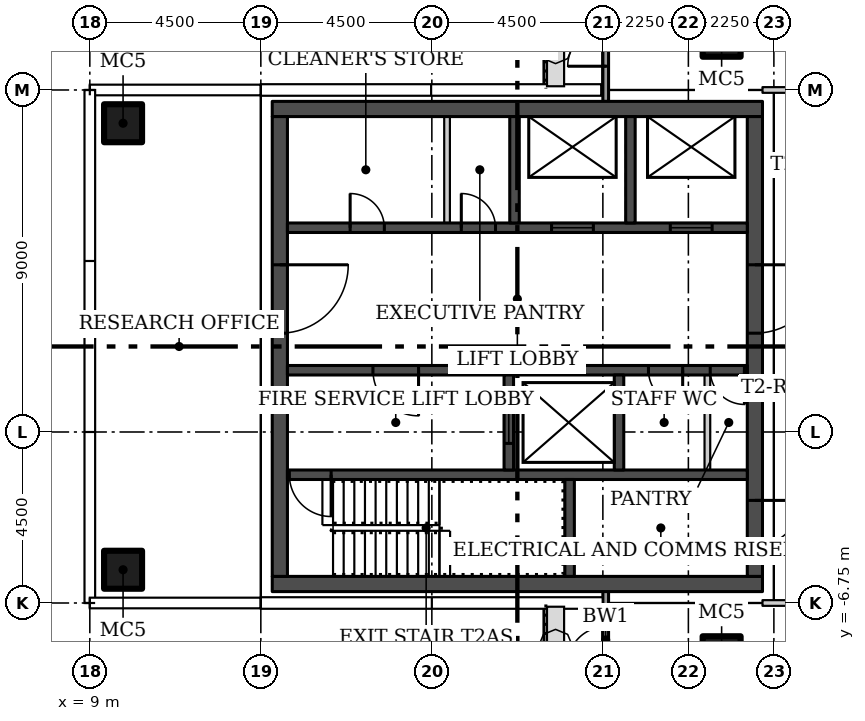
"""IFC4 building model, lengths in metres.
Left out: names, types, materials, properties, quantities, classifications, styles, units other than length and angle.
Written with IfcOpenShell. Run it as: python <this file> out.ifc"""

import sys

from ifc_helpers import new_model, si_unit, direction, frame, frame_2d, origin, origin_2d, place, context, subcontext, project, spatial, rectangle, hollow_rectangle, extrude, element, fill, save


model = new_model("IFC4")
c1 = context("Model", 3, precision=1e-05, world=origin(), true_north=direction((0.0, 1.0)))
c2 = subcontext(c1, "Body", "Model", "MODEL_VIEW")
j1 = project(units=[si_unit("LENGTHUNIT", "METRE"), si_unit("PLANEANGLEUNIT", "RADIAN")], contexts=[c1])
p1 = place(None, origin())
s1 = spatial("IfcSite", under=j1, at=p1, CompositionType="ELEMENT")
p2 = place(p1, origin())
s2 = spatial("IfcBuilding", under=s1, at=p2, CompositionType="ELEMENT")
p3 = place(p2, frame((0.0, 0.0, 182.7)))
s3 = spatial("IfcBuildingStorey", under=s2, at=p3, CompositionType="ELEMENT", Elevation=182.7)
for number, where in (
    (1, (25.625, 8.125, 0.0)),
    (2, (25.625, -8.125, 0.0)),
    (3, (9.875, -5.875, 0.0)),
    (4, (9.875, 5.875, 0.0)),
):
    element("IfcColumn", number, at=place(p3, frame(where)), inside=s3, PredefinedType="COLUMN", context=c2, shape_type="SweptSolid", body=[
        extrude(hollow_rectangle(XDim=1.0, YDim=1.0, WallThickness=0.04, at=origin_2d()), origin(), (0.0, 0.0, 1.0), 3.55),
    ])
p4 = place(p3, frame((26.7, 6.75, 0.0)))
e5 = element("IfcWall", 5, at=p4, inside=s3, PredefinedType="PARTITIONING", context=c2, shape_type="SweptSolid", body=[
    extrude(rectangle(XDim=14.1, YDim=0.15, at=frame_2d((7.05, 0.0))), origin(), (0.0, 0.0, 1.0), 3.55),
])
p5 = place(p4, frame((10.8, 0.0, 0.0)))
e6 = element("IfcOpeningElement", 6, at=p5, cuts=e5, PredefinedType="OPENING", context=c2, shape_type="SweptSolid", body=[
    extrude(rectangle(XDim=1.5, YDim=2.1, at=frame_2d((0.75, 1.05))), frame((0.0, 0.085, 0.0), z_axis=(0.0, -1.0, 0.0), x_axis=(1.0, 0.0, 0.0)), (0.0, 0.0, 1.0), 0.17),
])
p6 = place(p4, frame((6.6, 0.0, 0.0)))
e7 = element("IfcOpeningElement", 7, at=p6, cuts=e5, PredefinedType="OPENING", context=c2, shape_type="SweptSolid", body=[
    extrude(rectangle(XDim=0.9, YDim=2.1, at=frame_2d((0.45, 1.05))), frame((0.0, 0.085, 0.0), z_axis=(0.0, -1.0, 0.0), x_axis=(1.0, 0.0, 0.0)), (0.0, 0.0, 1.0), 0.17),
])
p7 = place(p4, frame((1.8, 0.0, 0.0)))
e8 = element("IfcOpeningElement", 8, at=p7, cuts=e5, PredefinedType="OPENING", context=c2, shape_type="SweptSolid", body=[
    extrude(rectangle(XDim=1.5, YDim=2.1, at=frame_2d((0.75, 1.05))), frame((0.0, 0.085, 0.0), z_axis=(0.0, -1.0, 0.0), x_axis=(1.0, 0.0, 0.0)), (0.0, 0.0, 1.0), 0.17),
])
p8 = place(p3, frame((40.8, -6.75, 0.0), z_axis=(0.0, 0.0, 1.0), x_axis=(-1.0, 0.0, 0.0)))
e9 = element("IfcWall", 9, at=p8, inside=s3, PredefinedType="PARTITIONING", context=c2, shape_type="SweptSolid", body=[
    extrude(rectangle(XDim=14.1, YDim=0.15, at=frame_2d((7.05, 0.0))), origin(), (0.0, 0.0, 1.0), 3.55),
])
p9 = place(p8, frame((6.3, 0.0, 0.0)))
e10 = element("IfcOpeningElement", 10, at=p9, cuts=e9, PredefinedType="OPENING", context=c2, shape_type="SweptSolid", body=[
    extrude(rectangle(XDim=1.5, YDim=2.1, at=frame_2d((0.75, 1.05))), frame((0.0, 0.085, 0.0), z_axis=(0.0, -1.0, 0.0), x_axis=(1.0, 0.0, 0.0)), (0.0, 0.0, 1.0), 0.17),
])
p10 = place(p3, frame((22.575, 6.448, 0.0), z_axis=(0.0, 0.0, 1.0), x_axis=(0.0, 1.0, 0.0)))
e11 = element("IfcWall", 11, at=p10, inside=s3, PredefinedType="SOLIDWALL", context=c2, shape_type="SweptSolid", body=[
    extrude(rectangle(XDim=2.552, YDim=0.15, at=frame_2d((1.276, 0.0))), origin(), (0.0, 0.0, 1.0), 3.45),
])
p11 = place(p10, frame((0.927, 0.0, 0.0)))
e12 = element("IfcOpeningElement", 12, at=p11, cuts=e11, PredefinedType="OPENING", context=c2, shape_type="SweptSolid", body=[
    extrude(rectangle(XDim=1.0, YDim=2.4, at=frame_2d((0.5, 1.2))), frame((0.0, 0.085, 0.0), z_axis=(0.0, -1.0, 0.0), x_axis=(1.0, 0.0, 0.0)), (0.0, 0.0, 1.0), 0.17),
])
p12 = place(p3, frame((22.575, -9.0, 0.0), z_axis=(0.0, 0.0, 1.0), x_axis=(0.0, 1.0, 0.0)))
e13 = element("IfcWall", 13, at=p12, inside=s3, PredefinedType="SOLIDWALL", context=c2, shape_type="SweptSolid", body=[
    extrude(rectangle(XDim=2.557, YDim=0.15, at=frame_2d((1.278, 0.0))), origin(), (0.0, 0.0, 1.0), 3.45),
])
p13 = place(p12, frame((0.625, 0.0, 0.0)))
e14 = element("IfcOpeningElement", 14, at=p13, cuts=e13, PredefinedType="OPENING", context=c2, shape_type="SweptSolid", body=[
    extrude(rectangle(XDim=1.0, YDim=2.4, at=frame_2d((0.5, 1.2))), frame((0.0, 0.085, 0.0), z_axis=(0.0, -1.0, 0.0), x_axis=(1.0, 0.0, 0.0)), (0.0, 0.0, 1.0), 0.17),
])
for number, where in (
    (15, (13.8, -6.25, 0.0)),
    (16, (13.8, 6.25, 0.0)),
):
    element("IfcWall", number, at=place(p3, frame(where)), inside=s3, PredefinedType="SHEAR", context=c2, shape_type="SweptSolid", body=[
        extrude(rectangle(XDim=12.9, YDim=0.4, at=frame_2d((6.45, 0.0))), origin(), (0.0, 0.0, 1.0), 3.55),
    ])
p14 = place(p3, frame((14.0, 6.05, 0.0), z_axis=(0.0, 0.0, 1.0), x_axis=(0.0, -1.0, 0.0)))
e17 = element("IfcWall", 17, at=p14, inside=s3, PredefinedType="SHEAR", context=c2, shape_type="SweptSolid", body=[
    extrude(rectangle(XDim=12.1, YDim=0.4, at=frame_2d((6.05, 0.0))), origin(), (0.0, 0.0, 1.0), 3.55),
])
p15 = place(p14, frame((3.9, 0.0, 0.0)))
e18 = element("IfcOpeningElement", 18, at=p15, cuts=e17, PredefinedType="OPENING", context=c2, shape_type="SweptSolid", body=[
    extrude(rectangle(XDim=1.8, YDim=2.4, at=frame_2d((0.9, 1.2))), frame((0.0, 0.21, 0.0), z_axis=(0.0, -1.0, 0.0), x_axis=(1.0, 0.0, 0.0)), (0.0, 0.0, 1.0), 0.42),
])
p16 = place(p3, frame((26.5, 6.05, 0.0), z_axis=(0.0, 0.0, 1.0), x_axis=(0.0, -1.0, 0.0)))
e19 = element("IfcWall", 19, at=p16, inside=s3, PredefinedType="SHEAR", context=c2, shape_type="SweptSolid", body=[
    extrude(rectangle(XDim=12.1, YDim=0.4, at=frame_2d((6.05, 0.0))), origin(), (0.0, 0.0, 1.0), 3.55),
])
p17 = place(p16, frame((10.1, 0.0, 0.0)))
e20 = element("IfcOpeningElement", 20, at=p17, cuts=e19, PredefinedType="OPENING", context=c2, shape_type="SweptSolid", body=[
    extrude(rectangle(XDim=1.2, YDim=2.1, at=frame_2d((0.6, 1.05))), frame((0.0, 0.21, 0.0), z_axis=(0.0, -1.0, 0.0), x_axis=(1.0, 0.0, 0.0)), (0.0, 0.0, 1.0), 0.42),
])
p18 = place(p16, frame((3.9, 0.0, 0.0)))
e21 = element("IfcOpeningElement", 21, at=p18, cuts=e19, PredefinedType="OPENING", context=c2, shape_type="SweptSolid", body=[
    extrude(rectangle(XDim=1.8, YDim=2.4, at=frame_2d((0.9, 1.2))), frame((0.0, 0.21, 0.0), z_axis=(0.0, -1.0, 0.0), x_axis=(1.0, 0.0, 0.0)), (0.0, 0.0, 1.0), 0.42),
])
p19 = place(p3, frame((26.3, -3.375, 0.0), z_axis=(0.0, 0.0, 1.0), x_axis=(-1.0, 0.0, 0.0)))
e22 = element("IfcWall", 22, at=p19, inside=s3, PredefinedType="SHEAR", context=c2, shape_type="SweptSolid", body=[
    extrude(rectangle(XDim=12.1, YDim=0.25, at=frame_2d((6.05, 0.0))), origin(), (0.0, 0.0, 1.0), 3.55),
])
p20 = place(p19, frame((10.95, 0.0, 0.0)))
e23 = element("IfcOpeningElement", 23, at=p20, cuts=e22, PredefinedType="OPENING", context=c2, shape_type="SweptSolid", body=[
    extrude(rectangle(XDim=1.1, YDim=2.1, at=frame_2d((0.55, 1.05))), frame((0.0, 0.135, 0.0), z_axis=(0.0, -1.0, 0.0), x_axis=(1.0, 0.0, 0.0)), (0.0, 0.0, 1.0), 0.27),
])
p21 = place(p3, frame((21.625, -6.05, 0.0), z_axis=(0.0, 0.0, 1.0), x_axis=(0.0, 1.0, 0.0)))
e24 = element("IfcWall", 24, at=p21, inside=s3, PredefinedType="SHEAR", context=c2, shape_type="SweptSolid", body=[
    extrude(rectangle(XDim=2.55, YDim=0.25, at=frame_2d((1.275, 0.0))), origin(), (0.0, 0.0, 1.0), 3.55),
])
p22 = place(p3, frame((26.3, -0.625, 0.0), z_axis=(0.0, 0.0, 1.0), x_axis=(-1.0, 0.0, 0.0)))
e25 = element("IfcWall", 25, at=p22, inside=s3, PredefinedType="SHEAR", context=c2, shape_type="SweptSolid", body=[
    extrude(rectangle(XDim=12.1, YDim=0.25, at=frame_2d((6.05, 0.0))), origin(), (0.0, 0.0, 1.0), 3.55),
])
p23 = place(p22, frame((8.65, 0.0, 0.0)))
e26 = element("IfcOpeningElement", 26, at=p23, cuts=e25, PredefinedType="OPENING", context=c2, shape_type="SweptSolid", body=[
    extrude(rectangle(XDim=1.2, YDim=2.1, at=frame_2d((0.6, 1.05))), frame((0.0, 0.135, 0.0), z_axis=(0.0, -1.0, 0.0), x_axis=(1.0, 0.0, 0.0)), (0.0, 0.0, 1.0), 0.27),
])
p24 = place(p22, frame((1.7, 0.0, 0.0)))
e27 = element("IfcOpeningElement", 27, at=p24, cuts=e25, PredefinedType="OPENING", context=c2, shape_type="SweptSolid", body=[
    extrude(rectangle(XDim=0.9, YDim=2.1, at=frame_2d((0.45, 1.05))), frame((0.0, 0.135, 0.0), z_axis=(0.0, -1.0, 0.0), x_axis=(1.0, 0.0, 0.0)), (0.0, 0.0, 1.0), 0.27),
])
p25 = place(p22, frame((0.075, 0.0, 0.0)))
e28 = element("IfcOpeningElement", 28, at=p25, cuts=e25, PredefinedType="OPENING", context=c2, shape_type="SweptSolid", body=[
    extrude(rectangle(XDim=0.9, YDim=2.1, at=frame_2d((0.45, 1.05))), frame((0.0, 0.135, 0.0), z_axis=(0.0, -1.0, 0.0), x_axis=(1.0, 0.0, 0.0)), (0.0, 0.0, 1.0), 0.27),
])
p26 = place(p3, frame((20.025, -3.25, 0.0), z_axis=(0.0, 0.0, 1.0), x_axis=(0.0, 1.0, 0.0)))
e29 = element("IfcWall", 29, at=p26, inside=s3, PredefinedType="SHEAR", context=c2, shape_type="SweptSolid", body=[
    extrude(rectangle(XDim=2.5, YDim=0.25, at=frame_2d((1.25, 0.0))), origin(), (0.0, 0.0, 1.0), 3.55),
])
p27 = place(p26, frame((0.7, 0.0, 0.0)))
e30 = element("IfcOpeningElement", 30, at=p27, cuts=e29, PredefinedType="OPENING", context=c2, shape_type="SweptSolid", body=[
    extrude(rectangle(XDim=1.1, YDim=2.1, at=frame_2d((0.55, 1.05))), frame((0.0, 0.135, 0.0), z_axis=(0.0, -1.0, 0.0), x_axis=(1.0, 0.0, 0.0)), (0.0, 0.0, 1.0), 0.27),
])
p28 = place(p3, frame((22.925, -3.25, 0.0), z_axis=(0.0, 0.0, 1.0), x_axis=(0.0, 1.0, 0.0)))
e31 = element("IfcWall", 31, at=p28, inside=s3, PredefinedType="SHEAR", context=c2, shape_type="SweptSolid", body=[
    extrude(rectangle(XDim=2.5, YDim=0.25, at=frame_2d((1.25, 0.0))), origin(), (0.0, 0.0, 1.0), 3.55),
])
p29 = place(p3, frame((25.25, -3.25, 0.0), z_axis=(0.0, 0.0, 1.0), x_axis=(0.0, 1.0, 0.0)))
e32 = element("IfcWall", 32, at=p29, inside=s3, PredefinedType="PARTITIONING", context=c2, shape_type="SweptSolid", body=[
    extrude(rectangle(XDim=2.5, YDim=0.15, at=frame_2d((1.25, 0.0))), origin(), (0.0, 0.0, 1.0), 3.55),
])
p30 = place(p3, frame((14.2, 3.125, 0.0)))
e33 = element("IfcWall", 33, at=p30, inside=s3, PredefinedType="SHEAR", context=c2, shape_type="SweptSolid", body=[
    extrude(rectangle(XDim=12.1, YDim=0.25, at=frame_2d((6.05, 0.0))), origin(), (0.0, 0.0, 1.0), 3.55),
])
p31 = place(p30, frame((6.95, 0.0, 0.0)))
e34 = element("IfcOpeningElement", 34, at=p31, cuts=e33, PredefinedType="OPENING", context=c2, shape_type="SweptSolid", body=[
    extrude(rectangle(XDim=1.1, YDim=2.1, at=frame_2d((0.55, 1.05))), frame((0.0, 0.135, 0.0), z_axis=(0.0, -1.0, 0.0), x_axis=(1.0, 0.0, 0.0)), (0.0, 0.0, 1.0), 0.27),
])
p32 = place(p30, frame((10.075, 0.0, 0.0)))
e35 = element("IfcOpeningElement", 35, at=p32, cuts=e33, PredefinedType="OPENING", context=c2, shape_type="SweptSolid", body=[
    extrude(rectangle(XDim=1.1, YDim=2.1, at=frame_2d((0.55, 1.05))), frame((0.0, 0.135, 0.0), z_axis=(0.0, -1.0, 0.0), x_axis=(1.0, 0.0, 0.0)), (0.0, 0.0, 1.0), 0.27),
])
p33 = place(p30, frame((1.65, 0.0, 0.0)))
e36 = element("IfcOpeningElement", 36, at=p33, cuts=e33, PredefinedType="OPENING", context=c2, shape_type="SweptSolid", body=[
    extrude(rectangle(XDim=0.9, YDim=2.1, at=frame_2d((0.45, 1.05))), frame((0.0, 0.135, 0.0), z_axis=(0.0, -1.0, 0.0), x_axis=(1.0, 0.0, 0.0)), (0.0, 0.0, 1.0), 0.27),
])
p34 = place(p30, frame((4.575, 0.0, 0.0)))
e37 = element("IfcOpeningElement", 37, at=p34, cuts=e33, PredefinedType="OPENING", context=c2, shape_type="SweptSolid", body=[
    extrude(rectangle(XDim=0.9, YDim=2.1, at=frame_2d((0.45, 1.05))), frame((0.0, 0.135, 0.0), z_axis=(0.0, -1.0, 0.0), x_axis=(1.0, 0.0, 0.0)), (0.0, 0.0, 1.0), 0.27),
])
for number, where, z_axis, x_axis in (
    (38, (20.175, 3.25, 0.0), (0.0, 0.0, 1.0), (0.0, 1.0, 0.0)),
    (39, (23.225, 3.25, 0.0), (0.0, 0.0, 1.0), (0.0, 1.0, 0.0)),
):
    element("IfcWall", number, at=place(p3, frame(where, z_axis=z_axis, x_axis=x_axis)), inside=s3, PredefinedType="SHEAR", context=c2, shape_type="SweptSolid", body=[
        extrude(rectangle(XDim=2.8, YDim=0.25, at=frame_2d((1.4, 0.0))), origin(), (0.0, 0.0, 1.0), 3.55),
    ])
p35 = place(p3, frame((18.4, 3.25, 0.0), z_axis=(0.0, 0.0, 1.0), x_axis=(0.0, 1.0, 0.0)))
e40 = element("IfcWall", 40, at=p35, inside=s3, PredefinedType="PARTITIONING", context=c2, shape_type="SweptSolid", body=[
    extrude(rectangle(XDim=2.8, YDim=0.15, at=frame_2d((1.4, 0.0))), origin(), (0.0, 0.0, 1.0), 3.55),
])
p36 = place(p11, origin())
e41 = element("IfcDoor", 41, at=p36, inside=s3, OperationType="SINGLE_SWING_LEFT", PredefinedType="DOOR", context=c2, shape_type="SweptSolid", body=[
    extrude(rectangle(XDim=1.0, YDim=2.4, at=frame_2d((0.5, 1.2))), frame((0.0, 0.025, 0.0), z_axis=(0.0, -1.0, 0.0), x_axis=(1.0, 0.0, 0.0)), (0.0, 0.0, 1.0), 0.05),
])
fill(e12, e41)
p37 = place(p13, origin())
e42 = element("IfcDoor", 42, at=p37, inside=s3, OperationType="SINGLE_SWING_LEFT", PredefinedType="DOOR", context=c2, shape_type="SweptSolid", body=[
    extrude(rectangle(XDim=1.0, YDim=2.4, at=frame_2d((0.5, 1.2))), frame((0.0, 0.025, 0.0), z_axis=(0.0, -1.0, 0.0), x_axis=(1.0, 0.0, 0.0)), (0.0, 0.0, 1.0), 0.05),
])
fill(e14, e42)
p38 = place(p15, origin())
e43 = element("IfcDoor", 43, at=p38, inside=s3, OperationType="DOUBLE_DOOR_SINGLE_SWING", PredefinedType="DOOR", context=c2, shape_type="SweptSolid", body=[
    extrude(rectangle(XDim=1.8, YDim=2.4, at=frame_2d((0.9, 1.2))), frame((0.0, 0.025, 0.0), z_axis=(0.0, -1.0, 0.0), x_axis=(1.0, 0.0, 0.0)), (0.0, 0.0, 1.0), 0.05),
])
fill(e18, e43)
p39 = place(p17, origin())
e44 = element("IfcDoor", 44, at=p39, inside=s3, OperationType="SINGLE_SWING_RIGHT", PredefinedType="DOOR", context=c2, shape_type="SweptSolid", body=[
    extrude(rectangle(XDim=1.2, YDim=2.1, at=frame_2d((0.6, 1.05))), frame((0.0, 0.025, 0.0), z_axis=(0.0, -1.0, 0.0), x_axis=(1.0, 0.0, 0.0)), (0.0, 0.0, 1.0), 0.05),
])
fill(e20, e44)
p40 = place(p18, origin())
e45 = element("IfcDoor", 45, at=p40, inside=s3, OperationType="DOUBLE_DOOR_SINGLE_SWING", PredefinedType="DOOR", context=c2, shape_type="SweptSolid", body=[
    extrude(rectangle(XDim=1.8, YDim=2.4, at=frame_2d((0.9, 1.2))), frame((0.0, 0.025, 0.0), z_axis=(0.0, -1.0, 0.0), x_axis=(1.0, 0.0, 0.0)), (0.0, 0.0, 1.0), 0.05),
])
fill(e21, e45)
p41 = place(p20, origin())
e46 = element("IfcDoor", 46, at=p41, inside=s3, OperationType="SINGLE_SWING_RIGHT", PredefinedType="DOOR", context=c2, shape_type="SweptSolid", body=[
    extrude(rectangle(XDim=1.1, YDim=2.1, at=frame_2d((0.55, 1.05))), frame((0.0, 0.025, 0.0), z_axis=(0.0, -1.0, 0.0), x_axis=(1.0, 0.0, 0.0)), (0.0, 0.0, 1.0), 0.05),
])
fill(e23, e46)
p42 = place(p23, origin())
e47 = element("IfcDoor", 47, at=p42, inside=s3, OperationType="SINGLE_SWING_RIGHT", PredefinedType="DOOR", context=c2, shape_type="SweptSolid", body=[
    extrude(rectangle(XDim=1.2, YDim=2.1, at=frame_2d((0.6, 1.05))), frame((0.0, 0.025, 0.0), z_axis=(0.0, -1.0, 0.0), x_axis=(1.0, 0.0, 0.0)), (0.0, 0.0, 1.0), 0.05),
])
fill(e26, e47)
p43 = place(p24, origin())
e48 = element("IfcDoor", 48, at=p43, inside=s3, OperationType="SINGLE_SWING_LEFT", PredefinedType="DOOR", context=c2, shape_type="SweptSolid", body=[
    extrude(rectangle(XDim=0.9, YDim=2.1, at=frame_2d((0.45, 1.05))), frame((0.0, 0.025, 0.0), z_axis=(0.0, -1.0, 0.0), x_axis=(1.0, 0.0, 0.0)), (0.0, 0.0, 1.0), 0.05),
])
fill(e27, e48)
p44 = place(p25, origin())
e49 = element("IfcDoor", 49, at=p44, inside=s3, OperationType="SINGLE_SWING_LEFT", PredefinedType="DOOR", context=c2, shape_type="SweptSolid", body=[
    extrude(rectangle(XDim=0.9, YDim=2.1, at=frame_2d((0.45, 1.05))), frame((0.0, 0.025, 0.0), z_axis=(0.0, -1.0, 0.0), x_axis=(1.0, 0.0, 0.0)), (0.0, 0.0, 1.0), 0.05),
])
fill(e28, e49)
p45 = place(p27, origin())
e50 = element("IfcDoor", 50, at=p45, inside=s3, OperationType="SLIDING_TO_LEFT", PredefinedType="DOOR", context=c2, shape_type="SweptSolid", body=[
    extrude(rectangle(XDim=1.1, YDim=2.1, at=frame_2d((0.55, 1.05))), frame((0.0, 0.025, 0.0), z_axis=(0.0, -1.0, 0.0), x_axis=(1.0, 0.0, 0.0)), (0.0, 0.0, 1.0), 0.05),
])
fill(e30, e50)
p46 = place(p31, origin())
e51 = element("IfcDoor", 51, at=p46, inside=s3, OperationType="SLIDING_TO_LEFT", PredefinedType="DOOR", context=c2, shape_type="SweptSolid", body=[
    extrude(rectangle(XDim=1.1, YDim=2.1, at=frame_2d((0.55, 1.05))), frame((0.0, 0.025, 0.0), z_axis=(0.0, -1.0, 0.0), x_axis=(1.0, 0.0, 0.0)), (0.0, 0.0, 1.0), 0.05),
])
fill(e34, e51)
p47 = place(p32, origin())
e52 = element("IfcDoor", 52, at=p47, inside=s3, OperationType="SLIDING_TO_LEFT", PredefinedType="DOOR", context=c2, shape_type="SweptSolid", body=[
    extrude(rectangle(XDim=1.1, YDim=2.1, at=frame_2d((0.55, 1.05))), frame((0.0, 0.025, 0.0), z_axis=(0.0, -1.0, 0.0), x_axis=(1.0, 0.0, 0.0)), (0.0, 0.0, 1.0), 0.05),
])
fill(e35, e52)
p48 = place(p33, origin())
e53 = element("IfcDoor", 53, at=p48, inside=s3, OperationType="SINGLE_SWING_LEFT", PredefinedType="DOOR", context=c2, shape_type="SweptSolid", body=[
    extrude(rectangle(XDim=0.9, YDim=2.1, at=frame_2d((0.45, 1.05))), frame((0.0, 0.025, 0.0), z_axis=(0.0, -1.0, 0.0), x_axis=(1.0, 0.0, 0.0)), (0.0, 0.0, 1.0), 0.05),
])
fill(e36, e53)
p49 = place(p34, origin())
e54 = element("IfcDoor", 54, at=p49, inside=s3, OperationType="SINGLE_SWING_LEFT", PredefinedType="DOOR", context=c2, shape_type="SweptSolid", body=[
    extrude(rectangle(XDim=0.9, YDim=2.1, at=frame_2d((0.45, 1.05))), frame((0.0, 0.025, 0.0), z_axis=(0.0, -1.0, 0.0), x_axis=(1.0, 0.0, 0.0)), (0.0, 0.0, 1.0), 0.05),
])
fill(e37, e54)
save(model, sys.argv[1])
